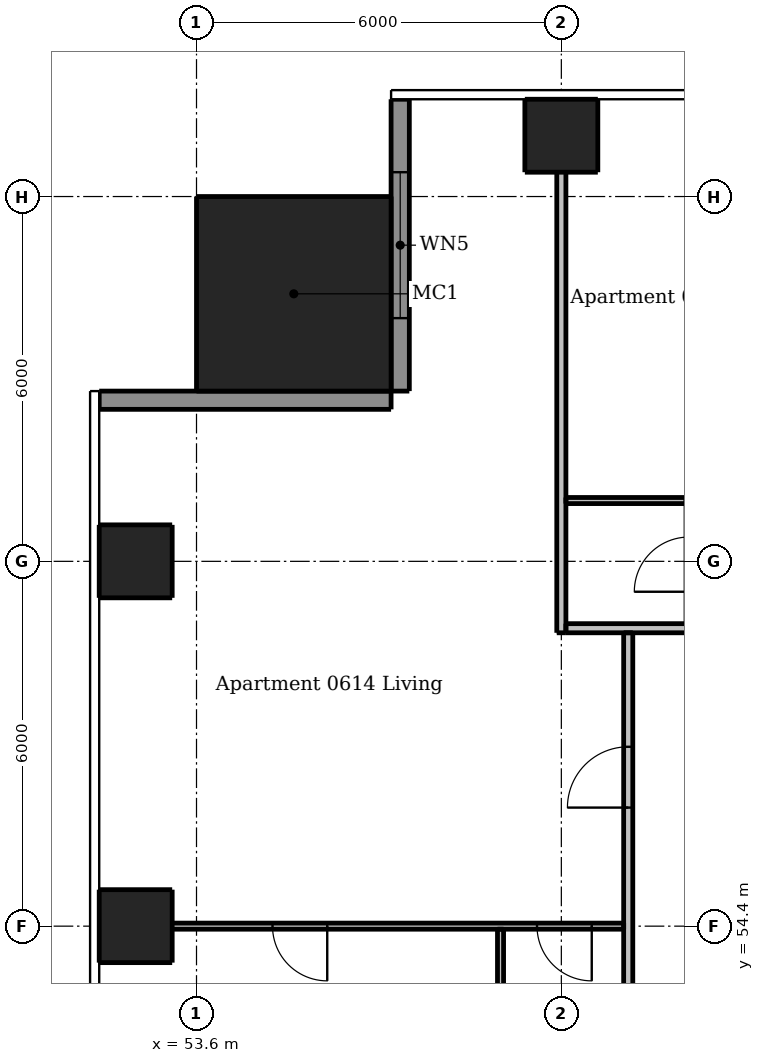
"""IFC4 building model, lengths in metres.
Left out: names, types, materials, properties, quantities, classifications, styles, units other than length and angle.
Written with IfcOpenShell. Run it as: python <this file> out.ifc"""

import sys

from ifc_helpers import new_model, si_unit, direction, frame, frame_2d, origin, origin_2d, place, context, subcontext, project, spatial, rectangle, extrude, element, fill, save


model = new_model("IFC4")
c1 = context("Model", 3, precision=1e-05, world=origin(), true_north=direction((0.0, 1.0)))
c2 = subcontext(c1, "Body", "Model", "MODEL_VIEW")
j1 = project(units=[si_unit("LENGTHUNIT", "METRE"), si_unit("PLANEANGLEUNIT", "RADIAN")], contexts=[c1])
p1 = place(None, origin())
s1 = spatial("IfcSite", under=j1, at=p1, CompositionType="ELEMENT")
p2 = place(p1, origin())
s2 = spatial("IfcBuilding", under=s1, at=p2, CompositionType="ELEMENT")
p3 = place(p2, frame((0.0, 0.0, 26.8)))
s3 = spatial("IfcBuildingStorey", under=s2, at=p3, CompositionType="ELEMENT", Elevation=26.8)
for number, where, z_axis, x_axis in (
    (1, (59.6, 67.4, 0.0), (0.0, 0.0, 1.0), (1.0, 0.0, 0.0)),
    (2, (52.6, 54.4, 0.0), (0.0, 0.0, 1.0), (1.0, 0.0, 0.0)),
    (3, (52.6, 60.4, 0.0), (0.0, 0.0, 1.0), (1.0, 0.0, 0.0)),
):
    element("IfcColumn", number, at=place(p3, frame(where, z_axis=z_axis, x_axis=x_axis)), inside=s3, PredefinedType="COLUMN", context=c2, shape_type="SweptSolid", body=[
        extrude(rectangle(XDim=1.2, YDim=1.2, at=origin_2d()), origin(), (0.0, 0.0, 1.0), 3.05),
    ])
p4 = place(p3, frame((55.2, 64.8, 0.0), z_axis=(0.0, 0.0, 1.0), x_axis=(1.0, 0.0, 0.0)))
e4 = element("IfcColumn", 4, at=p4, inside=s3, PredefinedType="COLUMN", context=c2, shape_type="SweptSolid", body=[
    extrude(rectangle(XDim=3.2, YDim=3.2, at=origin_2d()), origin(), (0.0, 0.0, 1.0), 3.3),
])
p5 = place(p3, frame((56.95, 68.0, 0.0), z_axis=(0.0, 0.0, 1.0), x_axis=(0.0, -1.0, 0.0)))
e5 = element("IfcWall", 5, at=p5, inside=s3, PredefinedType="SOLIDWALL", context=c2, shape_type="SweptSolid", body=[
    extrude(rectangle(XDim=4.8, YDim=0.3, at=frame_2d((2.4, 0.0))), origin(), (0.0, 0.0, 1.0), 3.05),
])
p6 = place(p5, frame((1.2, 0.0, 0.15)))
e6 = element("IfcOpeningElement", 6, at=p6, cuts=e5, PredefinedType="OPENING", context=c2, shape_type="SweptSolid", body=[
    extrude(rectangle(XDim=2.4, YDim=2.1, at=frame_2d((1.2, 1.05))), frame((0.0, 0.16, 0.0), z_axis=(0.0, -1.0, 0.0), x_axis=(1.0, 0.0, 0.0)), (0.0, 0.0, 1.0), 0.32),
])
p7 = place(p3, frame((56.8, 63.05, 0.0), z_axis=(0.0, 0.0, 1.0), x_axis=(-1.0, 0.0, 0.0)))
e7 = element("IfcWall", 7, at=p7, inside=s3, PredefinedType="SOLIDWALL", context=c2, shape_type="SweptSolid", body=[
    extrude(rectangle(XDim=4.8, YDim=0.3, at=frame_2d((2.4, 0.0))), origin(), (0.0, 0.0, 1.0), 3.05),
])
p8 = place(p3, frame((58.6, 54.35, 0.0), z_axis=(0.0, 0.0, 1.0), x_axis=(0.0, -1.0, 0.0)))
e8 = element("IfcWall", 8, at=p8, inside=s3, PredefinedType="PARTITIONING", context=c2, shape_type="SweptSolid", body=[
    extrude(rectangle(XDim=8.1, YDim=0.1, at=frame_2d((4.05, 0.0))), origin(), (0.0, 0.0, 1.0), 3.05),
])
p9 = place(p8, frame((3.75, 0.0, 0.0)))
e9 = element("IfcOpeningElement", 9, at=p9, cuts=e8, PredefinedType="OPENING", context=c2, shape_type="SweptSolid", body=[
    extrude(rectangle(XDim=0.8, YDim=2.1, at=frame_2d((0.4, 1.05))), frame((0.0, 0.06, 0.0), z_axis=(0.0, -1.0, 0.0), x_axis=(1.0, 0.0, 0.0)), (0.0, 0.0, 1.0), 0.12),
])
p10 = place(p3, frame((59.675, 61.4, 0.0), z_axis=(0.0, 0.0, 1.0), x_axis=(1.0, 0.0, 0.0)))
e10 = element("IfcWall", 10, at=p10, inside=s3, PredefinedType="PARTITIONING", context=c2, shape_type="SweptSolid", body=[
    extrude(rectangle(XDim=1.975, YDim=0.1, at=frame_2d((0.987, 0.0))), origin(), (0.0, 0.0, 1.0), 3.05),
])
p11 = place(p3, frame((60.625, 54.4, 0.0), z_axis=(0.0, 0.0, 1.0), x_axis=(-1.0, 0.0, 0.0)))
e11 = element("IfcWall", 11, at=p11, inside=s3, PredefinedType="PARTITIONING", context=c2, shape_type="SweptSolid", body=[
    extrude(rectangle(XDim=8.625, YDim=0.1, at=frame_2d((4.312, 0.0))), origin(), (0.0, 0.0, 1.0), 2.516),
])
p12 = place(p11, frame((0.525, 0.0, 0.0)))
e12 = element("IfcOpeningElement", 12, at=p12, cuts=e11, PredefinedType="OPENING", context=c2, shape_type="SweptSolid", body=[
    extrude(rectangle(XDim=0.9, YDim=2.1, at=frame_2d((0.45, 1.05))), frame((0.0, 0.06, 0.0), z_axis=(0.0, -1.0, 0.0), x_axis=(1.0, 0.0, 0.0)), (0.0, 0.0, 1.0), 0.12),
])
p13 = place(p11, frame((4.875, 0.0, 0.0)))
e13 = element("IfcOpeningElement", 13, at=p13, cuts=e11, PredefinedType="OPENING", context=c2, shape_type="SweptSolid", body=[
    extrude(rectangle(XDim=0.9, YDim=2.1, at=frame_2d((0.45, 1.05))), frame((0.0, 0.06, 0.0), z_axis=(0.0, -1.0, 0.0), x_axis=(1.0, 0.0, 0.0)), (0.0, 0.0, 1.0), 0.12),
])
p14 = place(p3, frame((59.6, 59.225, 0.0), z_axis=(0.0, 0.0, 1.0), x_axis=(0.0, 1.0, 0.0)))
e14 = element("IfcWall", 14, at=p14, inside=s3, PredefinedType="PARTITIONING", context=c2, shape_type="SweptSolid", body=[
    extrude(rectangle(XDim=8.775, YDim=0.15, at=frame_2d((4.387, 0.0))), origin(), (0.0, 0.0, 1.0), 2.51),
])
p15 = place(p3, frame((60.7, 30.325, 0.0), z_axis=(0.0, 0.0, 1.0), x_axis=(0.0, 1.0, 0.0)))
e15 = element("IfcWall", 15, at=p15, inside=s3, PredefinedType="PARTITIONING", context=c2, shape_type="SweptSolid", body=[
    extrude(rectangle(XDim=28.9, YDim=0.15, at=frame_2d((14.45, 0.0))), origin(), (0.0, 0.0, 1.0), 3.05),
])
p16 = place(p15, frame((2.575, 0.0, 0.0)))
e16 = element("IfcOpeningElement", 16, at=p16, cuts=e15, PredefinedType="OPENING", context=c2, shape_type="SweptSolid", body=[
    extrude(rectangle(XDim=1.0, YDim=2.1, at=frame_2d((0.5, 1.05))), frame((0.0, 0.085, 0.0), z_axis=(0.0, -1.0, 0.0), x_axis=(1.0, 0.0, 0.0)), (0.0, 0.0, 1.0), 0.17),
])
p17 = place(p15, frame((8.575, 0.0, 0.0)))
e17 = element("IfcOpeningElement", 17, at=p17, cuts=e15, PredefinedType="OPENING", context=c2, shape_type="SweptSolid", body=[
    extrude(rectangle(XDim=1.0, YDim=2.1, at=frame_2d((0.5, 1.05))), frame((0.0, 0.085, 0.0), z_axis=(0.0, -1.0, 0.0), x_axis=(1.0, 0.0, 0.0)), (0.0, 0.0, 1.0), 0.17),
])
p18 = place(p15, frame((14.575, 0.0, 0.0)))
e18 = element("IfcOpeningElement", 18, at=p18, cuts=e15, PredefinedType="OPENING", context=c2, shape_type="SweptSolid", body=[
    extrude(rectangle(XDim=1.0, YDim=2.1, at=frame_2d((0.5, 1.05))), frame((0.0, 0.085, 0.0), z_axis=(0.0, -1.0, 0.0), x_axis=(1.0, 0.0, 0.0)), (0.0, 0.0, 1.0), 0.17),
])
p19 = place(p15, frame((26.025, 0.0, 0.0)))
e19 = element("IfcOpeningElement", 19, at=p19, cuts=e15, PredefinedType="OPENING", context=c2, shape_type="SweptSolid", body=[
    extrude(rectangle(XDim=1.0, YDim=2.1, at=frame_2d((0.5, 1.05))), frame((0.0, 0.085, 0.0), z_axis=(0.0, -1.0, 0.0), x_axis=(1.0, 0.0, 0.0)), (0.0, 0.0, 1.0), 0.17),
])
p20 = place(p3, frame((59.675, 59.3, 0.0), z_axis=(0.0, 0.0, 1.0), x_axis=(1.0, 0.0, 0.0)))
e20 = element("IfcWall", 20, at=p20, inside=s3, PredefinedType="PARTITIONING", context=c2, shape_type="SweptSolid", body=[
    extrude(rectangle(XDim=28.55, YDim=0.15, at=frame_2d((14.275, 0.0))), origin(), (0.0, 0.0, 1.0), 3.05),
])
p21 = place(p20, frame((2.425, 0.0, 0.0)))
e21 = element("IfcOpeningElement", 21, at=p21, cuts=e20, PredefinedType="OPENING", context=c2, shape_type="SweptSolid", body=[
    extrude(rectangle(XDim=1.0, YDim=2.1, at=frame_2d((0.5, 1.05))), frame((0.0, 0.085, 0.0), z_axis=(0.0, -1.0, 0.0), x_axis=(1.0, 0.0, 0.0)), (0.0, 0.0, 1.0), 0.17),
])
p22 = place(p20, frame((8.425, 0.0, 0.0)))
e22 = element("IfcOpeningElement", 22, at=p22, cuts=e20, PredefinedType="OPENING", context=c2, shape_type="SweptSolid", body=[
    extrude(rectangle(XDim=1.0, YDim=2.1, at=frame_2d((0.5, 1.05))), frame((0.0, 0.085, 0.0), z_axis=(0.0, -1.0, 0.0), x_axis=(1.0, 0.0, 0.0)), (0.0, 0.0, 1.0), 0.17),
])
p23 = place(p20, frame((14.425, 0.0, 0.0)))
e23 = element("IfcOpeningElement", 23, at=p23, cuts=e20, PredefinedType="OPENING", context=c2, shape_type="SweptSolid", body=[
    extrude(rectangle(XDim=1.0, YDim=2.1, at=frame_2d((0.5, 1.05))), frame((0.0, 0.085, 0.0), z_axis=(0.0, -1.0, 0.0), x_axis=(1.0, 0.0, 0.0)), (0.0, 0.0, 1.0), 0.17),
])
p24 = place(p20, frame((25.775, 0.0, 0.0)))
e24 = element("IfcOpeningElement", 24, at=p24, cuts=e20, PredefinedType="OPENING", context=c2, shape_type="SweptSolid", body=[
    extrude(rectangle(XDim=1.0, YDim=2.1, at=frame_2d((0.5, 1.05))), frame((0.0, 0.085, 0.0), z_axis=(0.0, -1.0, 0.0), x_axis=(1.0, 0.0, 0.0)), (0.0, 0.0, 1.0), 0.17),
])
p25 = place(p6, origin())
e25 = element("IfcWindow", 25, at=p25, inside=s3, PartitioningType="DOUBLE_PANEL_VERTICAL", PredefinedType="WINDOW", context=c2, shape_type="SweptSolid", body=[
    extrude(rectangle(XDim=2.4, YDim=2.1, at=frame_2d((1.2, 1.05))), frame((0.0, 0.03, 0.0), z_axis=(0.0, -1.0, 0.0), x_axis=(1.0, 0.0, 0.0)), (0.0, 0.0, 1.0), 0.06),
])
fill(e6, e25)
p26 = place(p19, origin())
e26 = element("IfcDoor", 26, at=p26, inside=s3, OperationType="SINGLE_SWING_LEFT", PredefinedType="DOOR", context=c2, shape_type="SweptSolid", body=[
    extrude(rectangle(XDim=1.0, YDim=2.1, at=frame_2d((0.5, 1.05))), frame((0.0, 0.025, 0.0), z_axis=(0.0, -1.0, 0.0), x_axis=(1.0, 0.0, 0.0)), (0.0, 0.0, 1.0), 0.05),
])
fill(e19, e26)
p27 = place(p12, origin())
e27 = element("IfcDoor", 27, at=p27, inside=s3, OperationType="SINGLE_SWING_LEFT", PredefinedType="DOOR", context=c2, shape_type="SweptSolid", body=[
    extrude(rectangle(XDim=0.9, YDim=2.1, at=frame_2d((0.45, 1.05))), frame((0.0, 0.025, 0.0), z_axis=(0.0, -1.0, 0.0), x_axis=(1.0, 0.0, 0.0)), (0.0, 0.0, 1.0), 0.05),
])
fill(e12, e27)
p28 = place(p13, origin())
e28 = element("IfcDoor", 28, at=p28, inside=s3, OperationType="SINGLE_SWING_LEFT", PredefinedType="DOOR", context=c2, shape_type="SweptSolid", body=[
    extrude(rectangle(XDim=0.9, YDim=2.1, at=frame_2d((0.45, 1.05))), frame((0.0, 0.025, 0.0), z_axis=(0.0, -1.0, 0.0), x_axis=(1.0, 0.0, 0.0)), (0.0, 0.0, 1.0), 0.05),
])
fill(e13, e28)
save(model, sys.argv[1])
